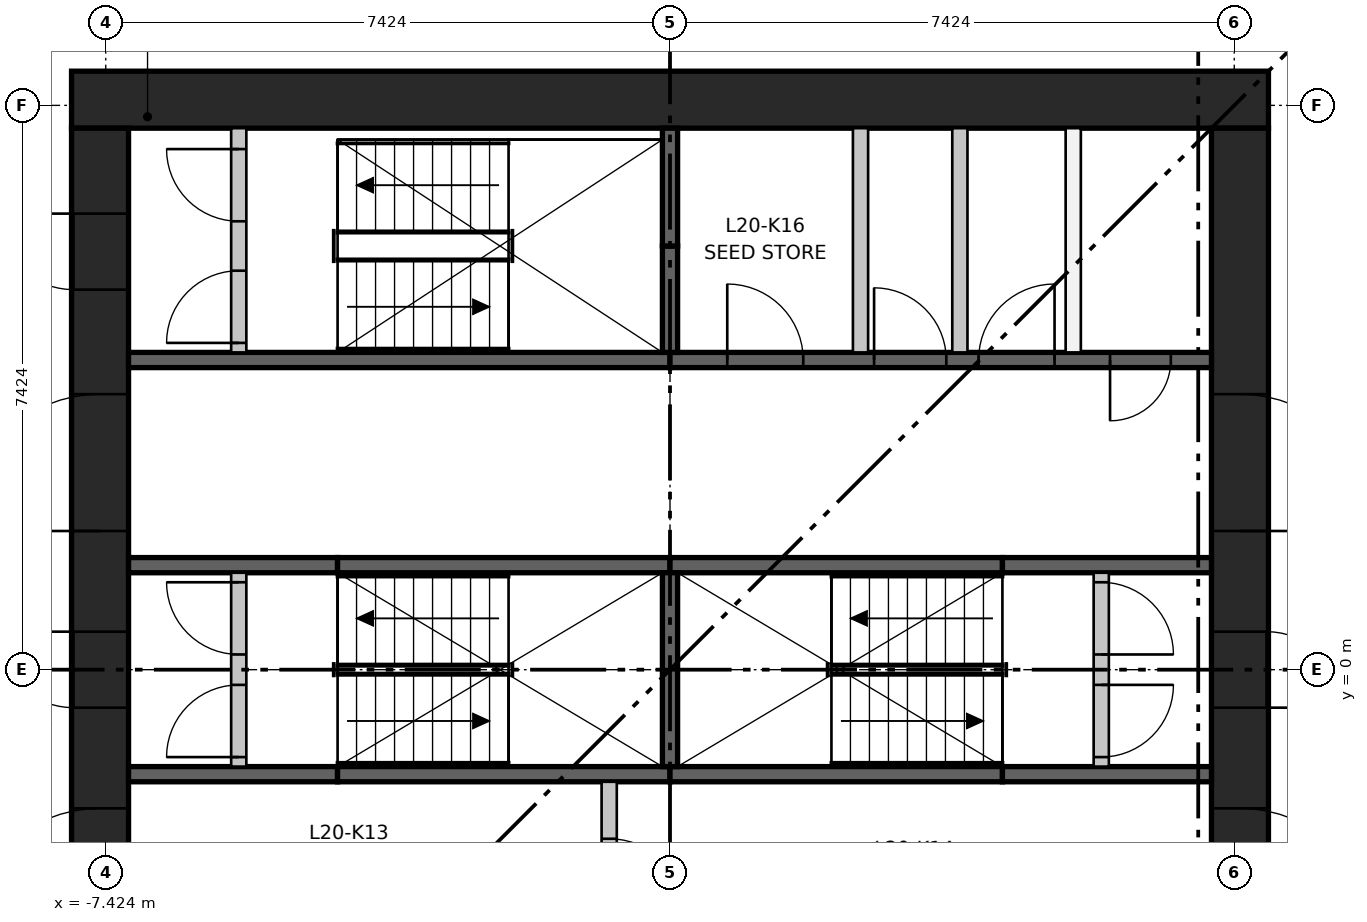
"""IFC4 building model, lengths in metres.
Left out: names, types, materials, properties, quantities, classifications, styles, units other than length and angle.
Written with IfcOpenShell. Run it as: python <this file> out.ifc"""

import sys

from ifc_helpers import new_model, si_unit, direction, frame, frame_2d, origin, place, context, subcontext, project, spatial, rectangle, extrude, element, fill, save


model = new_model("IFC4")
c1 = context("Model", 3, precision=1e-05, world=origin(), true_north=direction((0.0, 1.0)))
c2 = subcontext(c1, "Body", "Model", "MODEL_VIEW")
j1 = project(units=[si_unit("LENGTHUNIT", "METRE"), si_unit("PLANEANGLEUNIT", "RADIAN")], contexts=[c1])
p1 = place(None, origin())
s1 = spatial("IfcSite", under=j1, at=p1, CompositionType="ELEMENT")
p2 = place(p1, origin())
s2 = spatial("IfcBuilding", under=s1, at=p2, CompositionType="ELEMENT")
p3 = place(p2, frame((0.0, 0.0, 80.05)))
s3 = spatial("IfcBuildingStorey", under=s2, at=p3, CompositionType="ELEMENT", Elevation=80.05)
p4 = place(p3, frame((-7.874, 7.499, 0.0), z_axis=(0.0, 0.0, 1.0), x_axis=(1.0, 0.0, 0.0)))
e1 = element("IfcWall", 1, at=p4, inside=s3, PredefinedType="SHEAR", context=c2, shape_type="SweptSolid", body=[
    extrude(rectangle(XDim=15.748, YDim=0.75, at=frame_2d((7.874, 0.0))), origin(), (0.0, 0.0, 1.0), 3.65),
])
p5 = place(p3, frame((-7.499, -7.124, 0.0), z_axis=(0.0, 0.0, 1.0), x_axis=(0.0, 1.0, 0.0)))
e2 = element("IfcWall", 2, at=p5, inside=s3, PredefinedType="SHEAR", context=c2, shape_type="SweptSolid", body=[
    extrude(rectangle(XDim=14.248, YDim=0.75, at=frame_2d((7.124, 0.0))), origin(), (0.0, 0.0, 1.0), 3.65),
])
p6 = place(p5, frame((6.624, 0.0, 0.0)))
e3 = element("IfcOpeningElement", 3, at=p6, cuts=e2, PredefinedType="OPENING", context=c2, shape_type="SweptSolid", body=[
    extrude(rectangle(XDim=1.0, YDim=2.1, at=frame_2d((0.5, 1.05))), frame((0.0, 0.385, 0.0), z_axis=(0.0, -1.0, 0.0), x_axis=(1.0, 0.0, 0.0)), (0.0, 0.0, 1.0), 0.77),
])
p7 = place(p5, frame((3.5, 0.0, 0.0)))
e4 = element("IfcOpeningElement", 4, at=p7, cuts=e2, PredefinedType="OPENING", context=c2, shape_type="SweptSolid", body=[
    extrude(rectangle(XDim=1.8, YDim=2.1, at=frame_2d((0.9, 1.05))), frame((0.0, 0.385, 0.0), z_axis=(0.0, -1.0, 0.0), x_axis=(1.0, 0.0, 0.0)), (0.0, 0.0, 1.0), 0.77),
])
p8 = place(p5, frame((8.948, 0.0, 0.0)))
e5 = element("IfcOpeningElement", 5, at=p8, cuts=e2, PredefinedType="OPENING", context=c2, shape_type="SweptSolid", body=[
    extrude(rectangle(XDim=1.8, YDim=2.1, at=frame_2d((0.9, 1.05))), frame((0.0, 0.385, 0.0), z_axis=(0.0, -1.0, 0.0), x_axis=(1.0, 0.0, 0.0)), (0.0, 0.0, 1.0), 0.77),
])
p9 = place(p5, frame((12.124, 0.0, 0.0)))
e6 = element("IfcOpeningElement", 6, at=p9, cuts=e2, PredefinedType="OPENING", context=c2, shape_type="SweptSolid", body=[
    extrude(rectangle(XDim=1.0, YDim=2.1, at=frame_2d((0.5, 1.05))), frame((0.0, 0.385, 0.0), z_axis=(0.0, -1.0, 0.0), x_axis=(1.0, 0.0, 0.0)), (0.0, 0.0, 1.0), 0.77),
])
p10 = place(p3, frame((7.499, -7.124, 0.0), z_axis=(0.0, 0.0, 1.0), x_axis=(0.0, 1.0, 0.0)))
e7 = element("IfcWall", 7, at=p10, inside=s3, PredefinedType="SHEAR", context=c2, shape_type="SweptSolid", body=[
    extrude(rectangle(XDim=14.248, YDim=0.75, at=frame_2d((7.124, 0.0))), origin(), (0.0, 0.0, 1.0), 3.65),
])
p11 = place(p10, frame((6.624, 0.0, 0.0)))
e8 = element("IfcOpeningElement", 8, at=p11, cuts=e7, PredefinedType="OPENING", context=c2, shape_type="SweptSolid", body=[
    extrude(rectangle(XDim=1.0, YDim=2.1, at=frame_2d((0.5, 1.05))), frame((0.0, 0.385, 0.0), z_axis=(0.0, -1.0, 0.0), x_axis=(1.0, 0.0, 0.0)), (0.0, 0.0, 1.0), 0.77),
])
p12 = place(p10, frame((3.5, 0.0, 0.0)))
e9 = element("IfcOpeningElement", 9, at=p12, cuts=e7, PredefinedType="OPENING", context=c2, shape_type="SweptSolid", body=[
    extrude(rectangle(XDim=1.8, YDim=2.1, at=frame_2d((0.9, 1.05))), frame((0.0, 0.385, 0.0), z_axis=(0.0, -1.0, 0.0), x_axis=(1.0, 0.0, 0.0)), (0.0, 0.0, 1.0), 0.77),
])
p13 = place(p10, frame((8.948, 0.0, 0.0)))
e10 = element("IfcOpeningElement", 10, at=p13, cuts=e7, PredefinedType="OPENING", context=c2, shape_type="SweptSolid", body=[
    extrude(rectangle(XDim=1.8, YDim=2.1, at=frame_2d((0.9, 1.05))), frame((0.0, 0.385, 0.0), z_axis=(0.0, -1.0, 0.0), x_axis=(1.0, 0.0, 0.0)), (0.0, 0.0, 1.0), 0.77),
])
p14 = place(p3, frame((-7.124, 4.074, 0.0), z_axis=(0.0, 0.0, 1.0), x_axis=(1.0, 0.0, 0.0)))
e11 = element("IfcWall", 11, at=p14, inside=s3, PredefinedType="SHEAR", context=c2, shape_type="SweptSolid", body=[
    extrude(rectangle(XDim=7.124, YDim=0.2, at=frame_2d((3.562, 0.0))), origin(), (0.0, 0.0, 1.0), 3.3),
])
p15 = place(p3, frame((0.0, 4.074, 0.0), z_axis=(0.0, 0.0, 1.0), x_axis=(1.0, 0.0, 0.0)))
e12 = element("IfcWall", 12, at=p15, inside=s3, PredefinedType="SHEAR", context=c2, shape_type="SweptSolid", body=[
    extrude(rectangle(XDim=7.124, YDim=0.2, at=frame_2d((3.562, 0.0))), origin(), (0.0, 0.0, 1.0), 3.3),
])
p16 = place(p15, frame((0.753, 0.0, 0.0)))
e13 = element("IfcOpeningElement", 13, at=p16, cuts=e12, PredefinedType="OPENING", context=c2, shape_type="SweptSolid", body=[
    extrude(rectangle(XDim=1.0, YDim=2.1, at=frame_2d((0.5, 1.05))), frame((0.0, 0.11, 0.0), z_axis=(0.0, -1.0, 0.0), x_axis=(1.0, 0.0, 0.0)), (0.0, 0.0, 1.0), 0.22),
])
p17 = place(p15, frame((2.685, 0.0, 0.0)))
e14 = element("IfcOpeningElement", 14, at=p17, cuts=e12, PredefinedType="OPENING", context=c2, shape_type="SweptSolid", body=[
    extrude(rectangle(XDim=0.95, YDim=2.1, at=frame_2d((0.475, 1.05))), frame((0.0, 0.11, 0.0), z_axis=(0.0, -1.0, 0.0), x_axis=(1.0, 0.0, 0.0)), (0.0, 0.0, 1.0), 0.22),
])
p18 = place(p15, frame((4.06, 0.0, 0.0)))
e15 = element("IfcOpeningElement", 15, at=p18, cuts=e12, PredefinedType="OPENING", context=c2, shape_type="SweptSolid", body=[
    extrude(rectangle(XDim=1.0, YDim=2.1, at=frame_2d((0.5, 1.05))), frame((0.0, 0.11, 0.0), z_axis=(0.0, -1.0, 0.0), x_axis=(1.0, 0.0, 0.0)), (0.0, 0.0, 1.0), 0.22),
])
p19 = place(p15, frame((5.79, 0.0, 0.0)))
e16 = element("IfcOpeningElement", 16, at=p19, cuts=e12, PredefinedType="OPENING", context=c2, shape_type="SweptSolid", body=[
    extrude(rectangle(XDim=0.8, YDim=2.1, at=frame_2d((0.4, 1.05))), frame((0.0, 0.11, 0.0), z_axis=(0.0, -1.0, 0.0), x_axis=(1.0, 0.0, 0.0)), (0.0, 0.0, 1.0), 0.22),
])
p20 = place(p3, frame((-7.124, -1.375, 0.0), z_axis=(0.0, 0.0, 1.0), x_axis=(1.0, 0.0, 0.0)))
e17 = element("IfcWall", 17, at=p20, inside=s3, PredefinedType="SHEAR", context=c2, shape_type="SweptSolid", body=[
    extrude(rectangle(XDim=2.75, YDim=0.2, at=frame_2d((1.375, 0.0))), origin(), (0.0, 0.0, 1.0), 3.3),
])
for number, where, z_axis, x_axis in (
    (18, (-4.374, -1.375, 0.0), (0.0, 0.0, 1.0), (1.0, 0.0, 0.0)),
    (19, (0.0, -1.375, 0.0), (0.0, 0.0, 1.0), (1.0, 0.0, 0.0)),
):
    element("IfcWall", number, at=place(p3, frame(where, z_axis=z_axis, x_axis=x_axis)), inside=s3, PredefinedType="SHEAR", context=c2, shape_type="SweptSolid", body=[
        extrude(rectangle(XDim=4.374, YDim=0.2, at=frame_2d((2.187, 0.0))), origin(), (0.0, 0.0, 1.0), 3.3),
    ])
for number, where, z_axis, x_axis in (
    (20, (4.374, -1.375, 0.0), (0.0, 0.0, 1.0), (1.0, 0.0, 0.0)),
    (21, (-7.124, 1.375, 0.0), (0.0, 0.0, 1.0), (1.0, 0.0, 0.0)),
):
    element("IfcWall", number, at=place(p3, frame(where, z_axis=z_axis, x_axis=x_axis)), inside=s3, PredefinedType="SHEAR", context=c2, shape_type="SweptSolid", body=[
        extrude(rectangle(XDim=2.75, YDim=0.2, at=frame_2d((1.375, 0.0))), origin(), (0.0, 0.0, 1.0), 3.3),
    ])
for number, where, z_axis, x_axis in (
    (22, (-4.374, 1.375, 0.0), (0.0, 0.0, 1.0), (1.0, 0.0, 0.0)),
    (23, (0.0, 1.375, 0.0), (0.0, 0.0, 1.0), (1.0, 0.0, 0.0)),
):
    element("IfcWall", number, at=place(p3, frame(where, z_axis=z_axis, x_axis=x_axis)), inside=s3, PredefinedType="SHEAR", context=c2, shape_type="SweptSolid", body=[
        extrude(rectangle(XDim=4.374, YDim=0.2, at=frame_2d((2.187, 0.0))), origin(), (0.0, 0.0, 1.0), 3.3),
    ])
p21 = place(p3, frame((4.374, 1.375, 0.0), z_axis=(0.0, 0.0, 1.0), x_axis=(1.0, 0.0, 0.0)))
e24 = element("IfcWall", 24, at=p21, inside=s3, PredefinedType="SHEAR", context=c2, shape_type="SweptSolid", body=[
    extrude(rectangle(XDim=2.75, YDim=0.2, at=frame_2d((1.375, 0.0))), origin(), (0.0, 0.0, 1.0), 3.3),
])
p22 = place(p3, frame((0.0, -1.275, 0.0), z_axis=(0.0, 0.0, 1.0), x_axis=(0.0, 1.0, 0.0)))
e25 = element("IfcWall", 25, at=p22, inside=s3, PredefinedType="SHEAR", context=c2, shape_type="SweptSolid", body=[
    extrude(rectangle(XDim=2.55, YDim=0.2, at=frame_2d((1.275, 0.0))), origin(), (0.0, 0.0, 1.0), 3.3),
])
p23 = place(p3, frame((-0.8, -3.974, 0.0), z_axis=(0.0, 0.0, 1.0), x_axis=(0.0, 1.0, 0.0)))
e26 = element("IfcWall", 26, at=p23, inside=s3, PredefinedType="PARTITIONING", context=c2, shape_type="SweptSolid", body=[
    extrude(rectangle(XDim=2.499, YDim=0.2, at=frame_2d((1.25, 0.0))), origin(), (0.0, 0.0, 1.0), 3.3),
])
p24 = place(p23, frame((0.75, 0.0, 0.0)))
e27 = element("IfcOpeningElement", 27, at=p24, cuts=e26, PredefinedType="OPENING", context=c2, shape_type="SweptSolid", body=[
    extrude(rectangle(XDim=1.0, YDim=2.1, at=frame_2d((0.5, 1.05))), frame((0.0, 0.11, 0.0), z_axis=(0.0, -1.0, 0.0), x_axis=(1.0, 0.0, 0.0)), (0.0, 0.0, 1.0), 0.22),
])
p25 = place(p3, frame((0.0, 4.174, 0.0), z_axis=(0.0, 0.0, 1.0), x_axis=(0.0, 1.0, 0.0)))
e28 = element("IfcWall", 28, at=p25, inside=s3, PredefinedType="SHEAR", context=c2, shape_type="SweptSolid", body=[
    extrude(rectangle(XDim=1.4, YDim=0.2, at=frame_2d((0.7, 0.0))), origin(), (0.0, 0.0, 1.0), 3.3),
])
p26 = place(p3, frame((0.0, 5.574, 0.0), z_axis=(0.0, 0.0, 1.0), x_axis=(0.0, 1.0, 0.0)))
e29 = element("IfcWall", 29, at=p26, inside=s3, PredefinedType="SHEAR", context=c2, shape_type="SweptSolid", body=[
    extrude(rectangle(XDim=1.55, YDim=0.2, at=frame_2d((0.775, 0.0))), origin(), (0.0, 0.0, 1.0), 3.3),
])
for number, where, z_axis, x_axis in (
    (30, (2.507, 4.174, 0.0), (0.0, 0.0, 1.0), (0.0, 1.0, 0.0)),
    (31, (3.814, 4.174, 0.0), (0.0, 0.0, 1.0), (0.0, 1.0, 0.0)),
    (32, (5.305, 4.174, 0.0), (0.0, 0.0, 1.0), (0.0, 1.0, 0.0)),
):
    element("IfcWall", number, at=place(p3, frame(where, z_axis=z_axis, x_axis=x_axis)), inside=s3, PredefinedType="PARTITIONING", context=c2, shape_type="SweptSolid", body=[
        extrude(rectangle(XDim=2.95, YDim=0.2, at=frame_2d((1.475, 0.0))), origin(), (0.0, 0.0, 1.0), 3.3),
    ])
p27 = place(p3, frame((-5.674, -1.275, 0.0), z_axis=(0.0, 0.0, 1.0), x_axis=(0.0, 1.0, 0.0)))
e33 = element("IfcWall", 33, at=p27, inside=s3, PredefinedType="PARTITIONING", context=c2, shape_type="SweptSolid", body=[
    extrude(rectangle(XDim=2.55, YDim=0.2, at=frame_2d((1.275, 0.0))), origin(), (0.0, 0.0, 1.0), 3.3),
])
p28 = place(p27, frame((0.125, 0.0, 0.0)))
e34 = element("IfcOpeningElement", 34, at=p28, cuts=e33, PredefinedType="OPENING", context=c2, shape_type="SweptSolid", body=[
    extrude(rectangle(XDim=0.95, YDim=2.1, at=frame_2d((0.475, 1.05))), frame((0.0, 0.11, 0.0), z_axis=(0.0, -1.0, 0.0), x_axis=(1.0, 0.0, 0.0)), (0.0, 0.0, 1.0), 0.22),
])
p29 = place(p27, frame((1.475, 0.0, 0.0)))
e35 = element("IfcOpeningElement", 35, at=p29, cuts=e33, PredefinedType="OPENING", context=c2, shape_type="SweptSolid", body=[
    extrude(rectangle(XDim=0.95, YDim=2.1, at=frame_2d((0.475, 1.05))), frame((0.0, 0.11, 0.0), z_axis=(0.0, -1.0, 0.0), x_axis=(1.0, 0.0, 0.0)), (0.0, 0.0, 1.0), 0.22),
])
p30 = place(p3, frame((5.674, -1.275, 0.0), z_axis=(0.0, 0.0, 1.0), x_axis=(0.0, 1.0, 0.0)))
e36 = element("IfcWall", 36, at=p30, inside=s3, PredefinedType="PARTITIONING", context=c2, shape_type="SweptSolid", body=[
    extrude(rectangle(XDim=2.55, YDim=0.2, at=frame_2d((1.275, 0.0))), origin(), (0.0, 0.0, 1.0), 3.3),
])
p31 = place(p30, frame((0.125, 0.0, 0.0)))
e37 = element("IfcOpeningElement", 37, at=p31, cuts=e36, PredefinedType="OPENING", context=c2, shape_type="SweptSolid", body=[
    extrude(rectangle(XDim=0.95, YDim=2.1, at=frame_2d((0.475, 1.05))), frame((0.0, 0.11, 0.0), z_axis=(0.0, -1.0, 0.0), x_axis=(1.0, 0.0, 0.0)), (0.0, 0.0, 1.0), 0.22),
])
p32 = place(p30, frame((1.475, 0.0, 0.0)))
e38 = element("IfcOpeningElement", 38, at=p32, cuts=e36, PredefinedType="OPENING", context=c2, shape_type="SweptSolid", body=[
    extrude(rectangle(XDim=0.95, YDim=2.1, at=frame_2d((0.475, 1.05))), frame((0.0, 0.11, 0.0), z_axis=(0.0, -1.0, 0.0), x_axis=(1.0, 0.0, 0.0)), (0.0, 0.0, 1.0), 0.22),
])
p33 = place(p3, frame((-5.674, 4.174, 0.0), z_axis=(0.0, 0.0, 1.0), x_axis=(0.0, 1.0, 0.0)))
e39 = element("IfcWall", 39, at=p33, inside=s3, PredefinedType="PARTITIONING", context=c2, shape_type="SweptSolid", body=[
    extrude(rectangle(XDim=2.95, YDim=0.2, at=frame_2d((1.475, 0.0))), origin(), (0.0, 0.0, 1.0), 3.3),
])
p34 = place(p33, frame((0.125, 0.0, 0.0)))
e40 = element("IfcOpeningElement", 40, at=p34, cuts=e39, PredefinedType="OPENING", context=c2, shape_type="SweptSolid", body=[
    extrude(rectangle(XDim=0.95, YDim=2.1, at=frame_2d((0.475, 1.05))), frame((0.0, 0.11, 0.0), z_axis=(0.0, -1.0, 0.0), x_axis=(1.0, 0.0, 0.0)), (0.0, 0.0, 1.0), 0.22),
])
p35 = place(p33, frame((1.725, 0.0, 0.0)))
e41 = element("IfcOpeningElement", 41, at=p35, cuts=e39, PredefinedType="OPENING", context=c2, shape_type="SweptSolid", body=[
    extrude(rectangle(XDim=0.95, YDim=2.1, at=frame_2d((0.475, 1.05))), frame((0.0, 0.11, 0.0), z_axis=(0.0, -1.0, 0.0), x_axis=(1.0, 0.0, 0.0)), (0.0, 0.0, 1.0), 0.22),
])
p36 = place(p28, origin())
e42 = element("IfcDoor", 42, at=p36, inside=s3, OperationType="SINGLE_SWING_LEFT", PredefinedType="DOOR", context=c2, shape_type="SweptSolid", body=[
    extrude(rectangle(XDim=0.95, YDim=2.1, at=frame_2d((0.475, 1.05))), frame((0.0, 0.025, 0.0), z_axis=(0.0, -1.0, 0.0), x_axis=(1.0, 0.0, 0.0)), (0.0, 0.0, 1.0), 0.05),
])
fill(e34, e42)
p37 = place(p29, origin())
e43 = element("IfcDoor", 43, at=p37, inside=s3, OperationType="SINGLE_SWING_RIGHT", PredefinedType="DOOR", context=c2, shape_type="SweptSolid", body=[
    extrude(rectangle(XDim=0.95, YDim=2.1, at=frame_2d((0.475, 1.05))), frame((0.0, 0.025, 0.0), z_axis=(0.0, -1.0, 0.0), x_axis=(1.0, 0.0, 0.0)), (0.0, 0.0, 1.0), 0.05),
])
fill(e35, e43)
p38 = place(p31, frame((0.95, 0.0, 0.0), z_axis=(0.0, 0.0, 1.0), x_axis=(-1.0, 0.0, 0.0)))
e44 = element("IfcDoor", 44, at=p38, inside=s3, OperationType="SINGLE_SWING_RIGHT", PredefinedType="DOOR", context=c2, shape_type="SweptSolid", body=[
    extrude(rectangle(XDim=0.95, YDim=2.1, at=frame_2d((0.475, 1.05))), frame((0.0, 0.025, 0.0), z_axis=(0.0, -1.0, 0.0), x_axis=(1.0, 0.0, 0.0)), (0.0, 0.0, 1.0), 0.05),
])
fill(e37, e44)
p39 = place(p32, frame((0.95, 0.0, 0.0), z_axis=(0.0, 0.0, 1.0), x_axis=(-1.0, 0.0, 0.0)))
e45 = element("IfcDoor", 45, at=p39, inside=s3, OperationType="SINGLE_SWING_LEFT", PredefinedType="DOOR", context=c2, shape_type="SweptSolid", body=[
    extrude(rectangle(XDim=0.95, YDim=2.1, at=frame_2d((0.475, 1.05))), frame((0.0, 0.025, 0.0), z_axis=(0.0, -1.0, 0.0), x_axis=(1.0, 0.0, 0.0)), (0.0, 0.0, 1.0), 0.05),
])
fill(e38, e45)
p40 = place(p34, origin())
e46 = element("IfcDoor", 46, at=p40, inside=s3, OperationType="SINGLE_SWING_LEFT", PredefinedType="DOOR", context=c2, shape_type="SweptSolid", body=[
    extrude(rectangle(XDim=0.95, YDim=2.1, at=frame_2d((0.475, 1.05))), frame((0.0, 0.025, 0.0), z_axis=(0.0, -1.0, 0.0), x_axis=(1.0, 0.0, 0.0)), (0.0, 0.0, 1.0), 0.05),
])
fill(e40, e46)
p41 = place(p35, origin())
e47 = element("IfcDoor", 47, at=p41, inside=s3, OperationType="SINGLE_SWING_RIGHT", PredefinedType="DOOR", context=c2, shape_type="SweptSolid", body=[
    extrude(rectangle(XDim=0.95, YDim=2.1, at=frame_2d((0.475, 1.05))), frame((0.0, 0.025, 0.0), z_axis=(0.0, -1.0, 0.0), x_axis=(1.0, 0.0, 0.0)), (0.0, 0.0, 1.0), 0.05),
])
fill(e41, e47)
p42 = place(p24, frame((1.0, 0.0, 0.0), z_axis=(0.0, 0.0, 1.0), x_axis=(-1.0, 0.0, 0.0)))
e48 = element("IfcDoor", 48, at=p42, inside=s3, OperationType="SINGLE_SWING_LEFT", PredefinedType="DOOR", context=c2, shape_type="SweptSolid", body=[
    extrude(rectangle(XDim=1.0, YDim=2.1, at=frame_2d((0.5, 1.05))), frame((0.0, 0.025, 0.0), z_axis=(0.0, -1.0, 0.0), x_axis=(1.0, 0.0, 0.0)), (0.0, 0.0, 1.0), 0.05),
])
fill(e27, e48)
p43 = place(p16, origin())
e49 = element("IfcDoor", 49, at=p43, inside=s3, OperationType="SINGLE_SWING_LEFT", PredefinedType="DOOR", context=c2, shape_type="SweptSolid", body=[
    extrude(rectangle(XDim=1.0, YDim=2.1, at=frame_2d((0.5, 1.05))), frame((0.0, 0.025, 0.0), z_axis=(0.0, -1.0, 0.0), x_axis=(1.0, 0.0, 0.0)), (0.0, 0.0, 1.0), 0.05),
])
fill(e13, e49)
p44 = place(p17, origin())
e50 = element("IfcDoor", 50, at=p44, inside=s3, OperationType="SINGLE_SWING_LEFT", PredefinedType="DOOR", context=c2, shape_type="SweptSolid", body=[
    extrude(rectangle(XDim=0.95, YDim=2.1, at=frame_2d((0.475, 1.05))), frame((0.0, 0.025, 0.0), z_axis=(0.0, -1.0, 0.0), x_axis=(1.0, 0.0, 0.0)), (0.0, 0.0, 1.0), 0.05),
])
fill(e14, e50)
p45 = place(p18, origin())
e51 = element("IfcDoor", 51, at=p45, inside=s3, OperationType="SINGLE_SWING_RIGHT", PredefinedType="DOOR", context=c2, shape_type="SweptSolid", body=[
    extrude(rectangle(XDim=1.0, YDim=2.1, at=frame_2d((0.5, 1.05))), frame((0.0, 0.025, 0.0), z_axis=(0.0, -1.0, 0.0), x_axis=(1.0, 0.0, 0.0)), (0.0, 0.0, 1.0), 0.05),
])
fill(e15, e51)
p46 = place(p19, frame((0.8, 0.0, 0.0), z_axis=(0.0, 0.0, 1.0), x_axis=(-1.0, 0.0, 0.0)))
e52 = element("IfcDoor", 52, at=p46, inside=s3, OperationType="SINGLE_SWING_LEFT", PredefinedType="DOOR", context=c2, shape_type="SweptSolid", body=[
    extrude(rectangle(XDim=0.8, YDim=2.1, at=frame_2d((0.4, 1.05))), frame((0.0, 0.025, 0.0), z_axis=(0.0, -1.0, 0.0), x_axis=(1.0, 0.0, 0.0)), (0.0, 0.0, 1.0), 0.05),
])
fill(e16, e52)
p47 = place(p6, origin())
e53 = element("IfcDoor", 53, at=p47, inside=s3, OperationType="SINGLE_SWING_RIGHT", PredefinedType="DOOR", context=c2, shape_type="SweptSolid", body=[
    extrude(rectangle(XDim=1.0, YDim=2.1, at=frame_2d((0.5, 1.05))), frame((0.0, 0.375, 0.0), z_axis=(0.0, -1.0, 0.0), x_axis=(1.0, 0.0, 0.0)), (0.0, 0.0, 1.0), 0.05),
])
fill(e3, e53)
p48 = place(p7, origin())
e54 = element("IfcDoor", 54, at=p48, inside=s3, OperationType="DOUBLE_DOOR_SINGLE_SWING", PredefinedType="DOOR", context=c2, shape_type="SweptSolid", body=[
    extrude(rectangle(XDim=1.8, YDim=2.1, at=frame_2d((0.9, 1.05))), frame((0.0, 0.025, 0.0), z_axis=(0.0, -1.0, 0.0), x_axis=(1.0, 0.0, 0.0)), (0.0, 0.0, 1.0), 0.05),
])
fill(e4, e54)
p49 = place(p8, origin())
e55 = element("IfcDoor", 55, at=p49, inside=s3, OperationType="DOUBLE_DOOR_SINGLE_SWING", PredefinedType="DOOR", context=c2, shape_type="SweptSolid", body=[
    extrude(rectangle(XDim=1.8, YDim=2.1, at=frame_2d((0.9, 1.05))), frame((0.0, 0.025, 0.0), z_axis=(0.0, -1.0, 0.0), x_axis=(1.0, 0.0, 0.0)), (0.0, 0.0, 1.0), 0.05),
])
fill(e5, e55)
p50 = place(p9, origin())
e56 = element("IfcDoor", 56, at=p50, inside=s3, OperationType="SINGLE_SWING_RIGHT", PredefinedType="DOOR", context=c2, shape_type="SweptSolid", body=[
    extrude(rectangle(XDim=1.0, YDim=2.1, at=frame_2d((0.5, 1.05))), frame((0.0, 0.375, 0.0), z_axis=(0.0, -1.0, 0.0), x_axis=(1.0, 0.0, 0.0)), (0.0, 0.0, 1.0), 0.05),
])
fill(e6, e56)
p51 = place(p11, frame((1.0, 0.0, 0.0), z_axis=(0.0, 0.0, 1.0), x_axis=(-1.0, 0.0, 0.0)))
e57 = element("IfcDoor", 57, at=p51, inside=s3, OperationType="SINGLE_SWING_LEFT", PredefinedType="DOOR", context=c2, shape_type="SweptSolid", body=[
    extrude(rectangle(XDim=1.0, YDim=2.1, at=frame_2d((0.5, 1.05))), frame((0.0, 0.375, 0.0), z_axis=(0.0, -1.0, 0.0), x_axis=(1.0, 0.0, 0.0)), (0.0, 0.0, 1.0), 0.05),
])
fill(e8, e57)
p52 = place(p12, frame((1.8, 0.0, 0.0), z_axis=(0.0, 0.0, 1.0), x_axis=(-1.0, 0.0, 0.0)))
e58 = element("IfcDoor", 58, at=p52, inside=s3, OperationType="DOUBLE_DOOR_SINGLE_SWING", PredefinedType="DOOR", context=c2, shape_type="SweptSolid", body=[
    extrude(rectangle(XDim=1.8, YDim=2.1, at=frame_2d((0.9, 1.05))), frame((0.0, 0.025, 0.0), z_axis=(0.0, -1.0, 0.0), x_axis=(1.0, 0.0, 0.0)), (0.0, 0.0, 1.0), 0.05),
])
fill(e9, e58)
p53 = place(p13, frame((1.8, 0.0, 0.0), z_axis=(0.0, 0.0, 1.0), x_axis=(-1.0, 0.0, 0.0)))
e59 = element("IfcDoor", 59, at=p53, inside=s3, OperationType="DOUBLE_DOOR_SINGLE_SWING", PredefinedType="DOOR", context=c2, shape_type="SweptSolid", body=[
    extrude(rectangle(XDim=1.8, YDim=2.1, at=frame_2d((0.9, 1.05))), frame((0.0, 0.025, 0.0), z_axis=(0.0, -1.0, 0.0), x_axis=(1.0, 0.0, 0.0)), (0.0, 0.0, 1.0), 0.05),
])
fill(e10, e59)
save(model, sys.argv[1])
